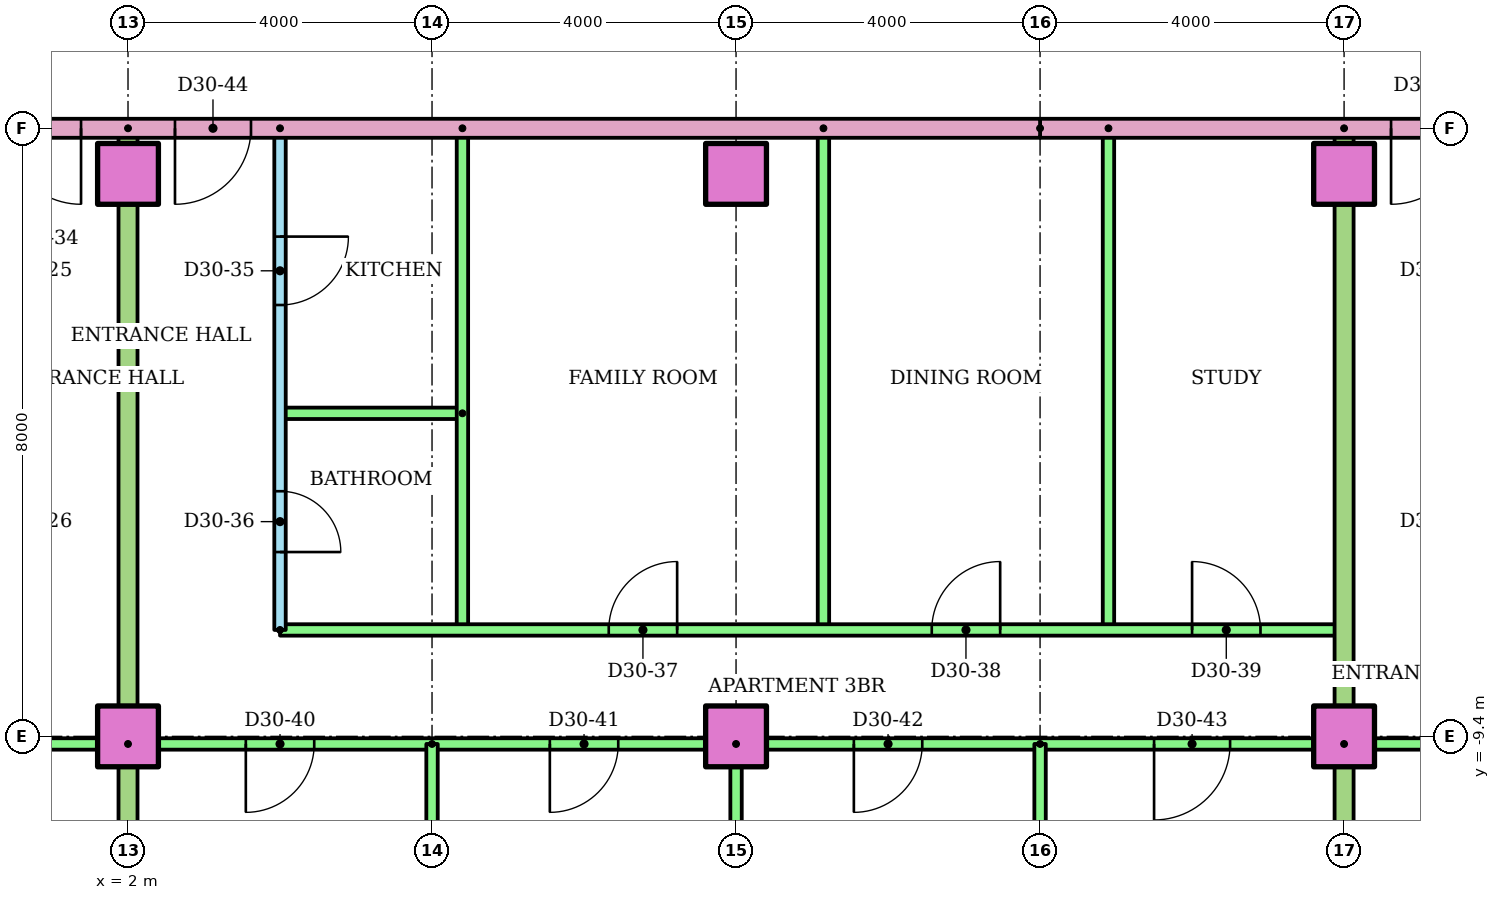
"""IFC4 building model, lengths in metres.
Left out: names, types, materials, properties, quantities, classifications, styles, units other than length and angle.
Written with IfcOpenShell. Run it as: python <this file> out.ifc"""

import sys

from ifc_helpers import new_model, si_unit, direction, frame, frame_2d, origin, origin_2d, place, context, subcontext, project, spatial, rectangle, extrude, element, fill, save


model = new_model("IFC4")
c1 = context("Model", 3, precision=1e-05, world=origin(), true_north=direction((0.0, 1.0)))
c2 = subcontext(c1, "Body", "Model", "MODEL_VIEW")
j1 = project(units=[si_unit("LENGTHUNIT", "METRE"), si_unit("PLANEANGLEUNIT", "RADIAN")], contexts=[c1])
p1 = place(None, origin())
s1 = spatial("IfcSite", under=j1, at=p1, CompositionType="ELEMENT")
p2 = place(p1, origin())
s2 = spatial("IfcBuilding", under=s1, at=p2, CompositionType="ELEMENT")
p3 = place(p2, frame((0.0, 0.0, 119.8)))
s3 = spatial("IfcBuildingStorey", under=s2, at=p3, CompositionType="ELEMENT", Elevation=119.8)
for number, where in (
    (1, (2.0, -9.4, 0.0)),
    (2, (10.0, -9.4, 0.0)),
    (3, (18.0, -9.4, 0.0)),
    (4, (2.0, -2.0, 0.0)),
    (5, (10.0, -2.0, 0.0)),
    (6, (18.0, -2.0, 0.0)),
):
    element("IfcColumn", number, at=place(p3, frame(where)), inside=s3, PredefinedType="COLUMN", context=c2, shape_type="SweptSolid", body=[
        extrude(rectangle(XDim=0.8, YDim=0.8, at=origin_2d()), origin(), (0.0, 0.0, 1.0), 3.2),
    ])
p4 = place(p3, frame((2.0, -9.5, 0.0), z_axis=(0.0, 0.0, 1.0), x_axis=(-1.0, 0.0, 0.0)))
e7 = element("IfcWall", 7, at=p4, inside=s3, PredefinedType="PARTITIONING", context=c2, shape_type="SweptSolid", body=[
    extrude(rectangle(XDim=16.0, YDim=0.15, at=frame_2d((8.0, 0.0))), origin(), (0.0, 0.0, 1.0), 2.4),
])
p5 = place(p4, frame((13.55, 0.0, 0.0)))
e8 = element("IfcOpeningElement", 8, at=p5, cuts=e7, PredefinedType="OPENING", context=c2, shape_type="SweptSolid", body=[
    extrude(rectangle(XDim=0.9, YDim=2.1, at=frame_2d((0.45, 1.05))), frame((0.0, 0.085, 0.0), z_axis=(0.0, -1.0, 0.0), x_axis=(1.0, 0.0, 0.0)), (0.0, 0.0, 1.0), 0.17),
])
p6 = place(p4, frame((9.5, 0.0, 0.0)))
e9 = element("IfcOpeningElement", 9, at=p6, cuts=e7, PredefinedType="OPENING", context=c2, shape_type="SweptSolid", body=[
    extrude(rectangle(XDim=1.0, YDim=2.1, at=frame_2d((0.5, 1.05))), frame((0.0, 0.085, 0.0), z_axis=(0.0, -1.0, 0.0), x_axis=(1.0, 0.0, 0.0)), (0.0, 0.0, 1.0), 0.17),
])
p7 = place(p4, frame((5.55, 0.0, 0.0)))
e10 = element("IfcOpeningElement", 10, at=p7, cuts=e7, PredefinedType="OPENING", context=c2, shape_type="SweptSolid", body=[
    extrude(rectangle(XDim=0.9, YDim=2.1, at=frame_2d((0.45, 1.05))), frame((0.0, 0.085, 0.0), z_axis=(0.0, -1.0, 0.0), x_axis=(1.0, 0.0, 0.0)), (0.0, 0.0, 1.0), 0.17),
])
p8 = place(p4, frame((1.55, 0.0, 0.0)))
e11 = element("IfcOpeningElement", 11, at=p8, cuts=e7, PredefinedType="OPENING", context=c2, shape_type="SweptSolid", body=[
    extrude(rectangle(XDim=0.9, YDim=2.1, at=frame_2d((0.45, 1.05))), frame((0.0, 0.085, 0.0), z_axis=(0.0, -1.0, 0.0), x_axis=(1.0, 0.0, 0.0)), (0.0, 0.0, 1.0), 0.17),
])
p9 = place(p3, frame((4.0, -1.4, 0.0), z_axis=(0.0, 0.0, 1.0), x_axis=(0.0, -1.0, 0.0)))
e12 = element("IfcWall", 12, at=p9, inside=s3, PredefinedType="PARTITIONING", context=c2, shape_type="SweptSolid", body=[
    extrude(rectangle(XDim=6.6, YDim=0.15, at=frame_2d((3.3, 0.0))), origin(), (0.0, 0.0, 1.0), 2.4),
])
p10 = place(p9, frame((1.425, 0.0, 0.0)))
e13 = element("IfcOpeningElement", 13, at=p10, cuts=e12, PredefinedType="OPENING", context=c2, shape_type="SweptSolid", body=[
    extrude(rectangle(XDim=0.9, YDim=2.1, at=frame_2d((0.45, 1.05))), frame((0.0, 0.085, 0.0), z_axis=(0.0, -1.0, 0.0), x_axis=(1.0, 0.0, 0.0)), (0.0, 0.0, 1.0), 0.17),
])
p11 = place(p9, frame((4.775, 0.0, 0.0)))
e14 = element("IfcOpeningElement", 14, at=p11, cuts=e12, PredefinedType="OPENING", context=c2, shape_type="SweptSolid", body=[
    extrude(rectangle(XDim=0.8, YDim=2.1, at=frame_2d((0.4, 1.05))), frame((0.0, 0.085, 0.0), z_axis=(0.0, -1.0, 0.0), x_axis=(1.0, 0.0, 0.0)), (0.0, 0.0, 1.0), 0.17),
])
p12 = place(p3, frame((6.4, -5.15, 0.0), z_axis=(0.0, 0.0, 1.0), x_axis=(-1.0, 0.0, 0.0)))
e15 = element("IfcWall", 15, at=p12, inside=s3, PredefinedType="PARTITIONING", context=c2, shape_type="SweptSolid", body=[
    extrude(rectangle(XDim=2.4, YDim=0.15, at=frame_2d((1.2, 0.0))), origin(), (0.0, 0.0, 1.0), 2.4),
])
for number, where, z_axis, x_axis in (
    (16, (6.4, -1.4, 0.0), (0.0, 0.0, 1.0), (0.0, -1.0, 0.0)),
    (17, (11.15, -1.4, 0.0), (0.0, 0.0, 1.0), (0.0, -1.0, 0.0)),
    (18, (14.9, -1.4, 0.0), (0.0, 0.0, 1.0), (0.0, -1.0, 0.0)),
):
    element("IfcWall", number, at=place(p3, frame(where, z_axis=z_axis, x_axis=x_axis)), inside=s3, PredefinedType="PARTITIONING", context=c2, shape_type="SweptSolid", body=[
        extrude(rectangle(XDim=6.6, YDim=0.15, at=frame_2d((3.3, 0.0))), origin(), (0.0, 0.0, 1.0), 2.4),
    ])
p13 = place(p3, frame((4.0, -8.0, 0.0)))
e19 = element("IfcWall", 19, at=p13, inside=s3, PredefinedType="PARTITIONING", context=c2, shape_type="SweptSolid", body=[
    extrude(rectangle(XDim=14.0, YDim=0.15, at=frame_2d((7.0, 0.0))), origin(), (0.0, 0.0, 1.0), 2.4),
])
p14 = place(p13, frame((4.325, 0.0, 0.0)))
e20 = element("IfcOpeningElement", 20, at=p14, cuts=e19, PredefinedType="OPENING", context=c2, shape_type="SweptSolid", body=[
    extrude(rectangle(XDim=0.9, YDim=2.1, at=frame_2d((0.45, 1.05))), frame((0.0, 0.085, 0.0), z_axis=(0.0, -1.0, 0.0), x_axis=(1.0, 0.0, 0.0)), (0.0, 0.0, 1.0), 0.17),
])
p15 = place(p13, frame((8.575, 0.0, 0.0)))
e21 = element("IfcOpeningElement", 21, at=p15, cuts=e19, PredefinedType="OPENING", context=c2, shape_type="SweptSolid", body=[
    extrude(rectangle(XDim=0.9, YDim=2.1, at=frame_2d((0.45, 1.05))), frame((0.0, 0.085, 0.0), z_axis=(0.0, -1.0, 0.0), x_axis=(1.0, 0.0, 0.0)), (0.0, 0.0, 1.0), 0.17),
])
p16 = place(p13, frame((12.0, 0.0, 0.0)))
e22 = element("IfcOpeningElement", 22, at=p16, cuts=e19, PredefinedType="OPENING", context=c2, shape_type="SweptSolid", body=[
    extrude(rectangle(XDim=0.9, YDim=2.1, at=frame_2d((0.45, 1.05))), frame((0.0, 0.085, 0.0), z_axis=(0.0, -1.0, 0.0), x_axis=(1.0, 0.0, 0.0)), (0.0, 0.0, 1.0), 0.17),
])
p17 = place(p3, frame((18.0, -9.5, 0.0), z_axis=(0.0, 0.0, 1.0), x_axis=(-1.0, 0.0, 0.0)))
e23 = element("IfcWall", 23, at=p17, inside=s3, PredefinedType="PARTITIONING", context=c2, shape_type="SweptSolid", body=[
    extrude(rectangle(XDim=16.0, YDim=0.15, at=frame_2d((8.0, 0.0))), origin(), (0.0, 0.0, 1.0), 2.4),
])
p18 = place(p17, frame((13.55, 0.0, 0.0)))
e24 = element("IfcOpeningElement", 24, at=p18, cuts=e23, PredefinedType="OPENING", context=c2, shape_type="SweptSolid", body=[
    extrude(rectangle(XDim=0.9, YDim=2.1, at=frame_2d((0.45, 1.05))), frame((0.0, 0.085, 0.0), z_axis=(0.0, -1.0, 0.0), x_axis=(1.0, 0.0, 0.0)), (0.0, 0.0, 1.0), 0.17),
])
p19 = place(p17, frame((9.55, 0.0, 0.0)))
e25 = element("IfcOpeningElement", 25, at=p19, cuts=e23, PredefinedType="OPENING", context=c2, shape_type="SweptSolid", body=[
    extrude(rectangle(XDim=0.9, YDim=2.1, at=frame_2d((0.45, 1.05))), frame((0.0, 0.085, 0.0), z_axis=(0.0, -1.0, 0.0), x_axis=(1.0, 0.0, 0.0)), (0.0, 0.0, 1.0), 0.17),
])
p20 = place(p17, frame((5.55, 0.0, 0.0)))
e26 = element("IfcOpeningElement", 26, at=p20, cuts=e23, PredefinedType="OPENING", context=c2, shape_type="SweptSolid", body=[
    extrude(rectangle(XDim=0.9, YDim=2.1, at=frame_2d((0.45, 1.05))), frame((0.0, 0.085, 0.0), z_axis=(0.0, -1.0, 0.0), x_axis=(1.0, 0.0, 0.0)), (0.0, 0.0, 1.0), 0.17),
])
p21 = place(p17, frame((1.5, 0.0, 0.0)))
e27 = element("IfcOpeningElement", 27, at=p21, cuts=e23, PredefinedType="OPENING", context=c2, shape_type="SweptSolid", body=[
    extrude(rectangle(XDim=1.0, YDim=2.1, at=frame_2d((0.5, 1.05))), frame((0.0, 0.085, 0.0), z_axis=(0.0, -1.0, 0.0), x_axis=(1.0, 0.0, 0.0)), (0.0, 0.0, 1.0), 0.17),
])
p22 = place(p3, frame((6.0, -9.5, 0.0), z_axis=(0.0, 0.0, 1.0), x_axis=(0.0, -1.0, 0.0)))
e28 = element("IfcWall", 28, at=p22, inside=s3, PredefinedType="PARTITIONING", context=c2, shape_type="SweptSolid", body=[
    extrude(rectangle(XDim=6.821, YDim=0.15, at=frame_2d((3.411, 0.0))), origin(), (0.0, 0.0, 1.0), 2.4),
])
p23 = place(p3, frame((10.0, -9.5, 0.0), z_axis=(0.0, 0.0, 1.0), x_axis=(0.0, -1.0, 0.0)))
e29 = element("IfcWall", 29, at=p23, inside=s3, PredefinedType="PARTITIONING", context=c2, shape_type="SweptSolid", body=[
    extrude(rectangle(XDim=6.81, YDim=0.15, at=frame_2d((3.405, 0.0))), origin(), (0.0, 0.0, 1.0), 2.4),
])
p24 = place(p3, frame((14.0, -9.5, 0.0), z_axis=(0.0, 0.0, 1.0), x_axis=(0.0, -1.0, 0.0)))
e30 = element("IfcWall", 30, at=p24, inside=s3, PredefinedType="PARTITIONING", context=c2, shape_type="SweptSolid", body=[
    extrude(rectangle(XDim=6.821, YDim=0.15, at=frame_2d((3.411, 0.0))), origin(), (0.0, 0.0, 1.0), 2.4),
])
p25 = place(p3, frame((2.0, -1.4, 0.0), z_axis=(0.0, 0.0, 1.0), x_axis=(0.0, -1.0, 0.0)))
e31 = element("IfcWall", 31, at=p25, inside=s3, PredefinedType="PARTITIONING", context=c2, shape_type="SweptSolid", body=[
    extrude(rectangle(XDim=14.91, YDim=0.25, at=frame_2d((7.455, 0.0))), origin(), (0.0, 0.0, 1.0), 2.4),
])
p26 = place(p3, frame((32.72, -9.5, 0.0), z_axis=(0.0, 0.0, 1.0), x_axis=(-1.0, 0.0, 0.0)))
e32 = element("IfcWall", 32, at=p26, inside=s3, PredefinedType="PARTITIONING", context=c2, shape_type="SweptSolid", body=[
    extrude(rectangle(XDim=14.72, YDim=0.15, at=frame_2d((7.36, 0.0))), origin(), (0.0, 0.0, 1.0), 2.4),
])
p27 = place(p26, frame((12.27, 0.0, 0.0)))
e33 = element("IfcOpeningElement", 33, at=p27, cuts=e32, PredefinedType="OPENING", context=c2, shape_type="SweptSolid", body=[
    extrude(rectangle(XDim=0.9, YDim=2.1, at=frame_2d((0.45, 1.05))), frame((0.0, 0.085, 0.0), z_axis=(0.0, -1.0, 0.0), x_axis=(1.0, 0.0, 0.0)), (0.0, 0.0, 1.0), 0.17),
])
p28 = place(p26, frame((8.22, 0.0, 0.0)))
e34 = element("IfcOpeningElement", 34, at=p28, cuts=e32, PredefinedType="OPENING", context=c2, shape_type="SweptSolid", body=[
    extrude(rectangle(XDim=1.0, YDim=2.1, at=frame_2d((0.5, 1.05))), frame((0.0, 0.085, 0.0), z_axis=(0.0, -1.0, 0.0), x_axis=(1.0, 0.0, 0.0)), (0.0, 0.0, 1.0), 0.17),
])
p29 = place(p26, frame((3.02, 0.0, 0.0)))
e35 = element("IfcOpeningElement", 35, at=p29, cuts=e32, PredefinedType="OPENING", context=c2, shape_type="SweptSolid", body=[
    extrude(rectangle(XDim=0.9, YDim=2.1, at=frame_2d((0.45, 1.05))), frame((0.0, 0.085, 0.0), z_axis=(0.0, -1.0, 0.0), x_axis=(1.0, 0.0, 0.0)), (0.0, 0.0, 1.0), 0.17),
])
p30 = place(p3, frame((18.0, -1.4, 0.0), z_axis=(0.0, 0.0, 1.0), x_axis=(0.0, -1.0, 0.0)))
e36 = element("IfcWall", 36, at=p30, inside=s3, PredefinedType="PARTITIONING", context=c2, shape_type="SweptSolid", body=[
    extrude(rectangle(XDim=14.91, YDim=0.25, at=frame_2d((7.455, 0.0))), origin(), (0.0, 0.0, 1.0), 2.4),
])
p31 = place(p3, frame((29.0, -1.4, 0.0), z_axis=(0.0, 0.0, 1.0), x_axis=(-1.0, 0.0, 0.0)))
e37 = element("IfcWall", 37, at=p31, inside=s3, PredefinedType="PARTITIONING", context=c2, shape_type="SweptSolid", body=[
    extrude(rectangle(XDim=15.0, YDim=0.25, at=frame_2d((7.5, 0.0))), origin(), (0.0, 0.0, 1.0), 2.4),
])
p32 = place(p31, frame((9.382, 0.0, 0.0)))
e38 = element("IfcOpeningElement", 38, at=p32, cuts=e37, PredefinedType="OPENING", context=c2, shape_type="SweptSolid", body=[
    extrude(rectangle(XDim=1.0, YDim=2.1, at=frame_2d((0.5, 1.05))), frame((0.0, 0.135, 0.0), z_axis=(0.0, -1.0, 0.0), x_axis=(1.0, 0.0, 0.0)), (0.0, 0.0, 1.0), 0.27),
])
p33 = place(p3, frame((14.0, -1.4, 0.0), z_axis=(0.0, 0.0, 1.0), x_axis=(-1.0, 0.0, 0.0)))
e39 = element("IfcWall", 39, at=p33, inside=s3, PredefinedType="PARTITIONING", context=c2, shape_type="SweptSolid", body=[
    extrude(rectangle(XDim=28.0, YDim=0.25, at=frame_2d((14.0, 0.0))), origin(), (0.0, 0.0, 1.0), 2.4),
])
p34 = place(p33, frame((12.618, 0.0, 0.0)))
e40 = element("IfcOpeningElement", 40, at=p34, cuts=e39, PredefinedType="OPENING", context=c2, shape_type="SweptSolid", body=[
    extrude(rectangle(XDim=1.0, YDim=2.1, at=frame_2d((0.5, 1.05))), frame((0.0, 0.135, 0.0), z_axis=(0.0, -1.0, 0.0), x_axis=(1.0, 0.0, 0.0)), (0.0, 0.0, 1.0), 0.27),
])
p35 = place(p33, frame((10.382, 0.0, 0.0)))
e41 = element("IfcOpeningElement", 41, at=p35, cuts=e39, PredefinedType="OPENING", context=c2, shape_type="SweptSolid", body=[
    extrude(rectangle(XDim=1.0, YDim=2.1, at=frame_2d((0.5, 1.05))), frame((0.0, 0.135, 0.0), z_axis=(0.0, -1.0, 0.0), x_axis=(1.0, 0.0, 0.0)), (0.0, 0.0, 1.0), 0.27),
])
p36 = place(p34, origin())
e42 = element("IfcDoor", 42, at=p36, inside=s3, OperationType="SINGLE_SWING_LEFT", PredefinedType="DOOR", context=c2, shape_type="SweptSolid", body=[
    extrude(rectangle(XDim=1.0, YDim=2.1, at=frame_2d((0.5, 1.05))), frame((0.0, 0.025, 0.0), z_axis=(0.0, -1.0, 0.0), x_axis=(1.0, 0.0, 0.0)), (0.0, 0.0, 1.0), 0.05),
])
fill(e40, e42)
p37 = place(p10, origin())
e43 = element("IfcDoor", 43, at=p37, inside=s3, OperationType="SINGLE_SWING_LEFT", PredefinedType="DOOR", context=c2, shape_type="SweptSolid", body=[
    extrude(rectangle(XDim=0.9, YDim=2.1, at=frame_2d((0.45, 1.05))), frame((0.0, 0.025, 0.0), z_axis=(0.0, -1.0, 0.0), x_axis=(1.0, 0.0, 0.0)), (0.0, 0.0, 1.0), 0.05),
])
fill(e13, e43)
p38 = place(p11, origin())
e44 = element("IfcDoor", 44, at=p38, inside=s3, OperationType="SINGLE_SWING_RIGHT", PredefinedType="DOOR", context=c2, shape_type="SweptSolid", body=[
    extrude(rectangle(XDim=0.8, YDim=2.1, at=frame_2d((0.4, 1.05))), frame((0.0, 0.025, 0.0), z_axis=(0.0, -1.0, 0.0), x_axis=(1.0, 0.0, 0.0)), (0.0, 0.0, 1.0), 0.05),
])
fill(e14, e44)
p39 = place(p14, origin())
e45 = element("IfcDoor", 45, at=p39, inside=s3, OperationType="SINGLE_SWING_RIGHT", PredefinedType="DOOR", context=c2, shape_type="SweptSolid", body=[
    extrude(rectangle(XDim=0.9, YDim=2.1, at=frame_2d((0.45, 1.05))), frame((0.0, 0.025, 0.0), z_axis=(0.0, -1.0, 0.0), x_axis=(1.0, 0.0, 0.0)), (0.0, 0.0, 1.0), 0.05),
])
fill(e20, e45)
p40 = place(p15, origin())
e46 = element("IfcDoor", 46, at=p40, inside=s3, OperationType="SINGLE_SWING_RIGHT", PredefinedType="DOOR", context=c2, shape_type="SweptSolid", body=[
    extrude(rectangle(XDim=0.9, YDim=2.1, at=frame_2d((0.45, 1.05))), frame((0.0, 0.025, 0.0), z_axis=(0.0, -1.0, 0.0), x_axis=(1.0, 0.0, 0.0)), (0.0, 0.0, 1.0), 0.05),
])
fill(e21, e46)
p41 = place(p16, origin())
e47 = element("IfcDoor", 47, at=p41, inside=s3, OperationType="SINGLE_SWING_LEFT", PredefinedType="DOOR", context=c2, shape_type="SweptSolid", body=[
    extrude(rectangle(XDim=0.9, YDim=2.1, at=frame_2d((0.45, 1.05))), frame((0.0, 0.025, 0.0), z_axis=(0.0, -1.0, 0.0), x_axis=(1.0, 0.0, 0.0)), (0.0, 0.0, 1.0), 0.05),
])
fill(e22, e47)
p42 = place(p18, origin())
e48 = element("IfcDoor", 48, at=p42, inside=s3, OperationType="SINGLE_SWING_RIGHT", PredefinedType="DOOR", context=c2, shape_type="SweptSolid", body=[
    extrude(rectangle(XDim=0.9, YDim=2.1, at=frame_2d((0.45, 1.05))), frame((0.0, 0.025, 0.0), z_axis=(0.0, -1.0, 0.0), x_axis=(1.0, 0.0, 0.0)), (0.0, 0.0, 1.0), 0.05),
])
fill(e24, e48)
p43 = place(p19, origin())
e49 = element("IfcDoor", 49, at=p43, inside=s3, OperationType="SINGLE_SWING_RIGHT", PredefinedType="DOOR", context=c2, shape_type="SweptSolid", body=[
    extrude(rectangle(XDim=0.9, YDim=2.1, at=frame_2d((0.45, 1.05))), frame((0.0, 0.025, 0.0), z_axis=(0.0, -1.0, 0.0), x_axis=(1.0, 0.0, 0.0)), (0.0, 0.0, 1.0), 0.05),
])
fill(e25, e49)
p44 = place(p20, origin())
e50 = element("IfcDoor", 50, at=p44, inside=s3, OperationType="SINGLE_SWING_RIGHT", PredefinedType="DOOR", context=c2, shape_type="SweptSolid", body=[
    extrude(rectangle(XDim=0.9, YDim=2.1, at=frame_2d((0.45, 1.05))), frame((0.0, 0.025, 0.0), z_axis=(0.0, -1.0, 0.0), x_axis=(1.0, 0.0, 0.0)), (0.0, 0.0, 1.0), 0.05),
])
fill(e26, e50)
p45 = place(p21, origin())
e51 = element("IfcDoor", 51, at=p45, inside=s3, OperationType="SINGLE_SWING_RIGHT", PredefinedType="DOOR", context=c2, shape_type="SweptSolid", body=[
    extrude(rectangle(XDim=1.0, YDim=2.1, at=frame_2d((0.5, 1.05))), frame((0.0, 0.025, 0.0), z_axis=(0.0, -1.0, 0.0), x_axis=(1.0, 0.0, 0.0)), (0.0, 0.0, 1.0), 0.05),
])
fill(e27, e51)
p46 = place(p35, origin())
e52 = element("IfcDoor", 52, at=p46, inside=s3, OperationType="SINGLE_SWING_RIGHT", PredefinedType="DOOR", context=c2, shape_type="SweptSolid", body=[
    extrude(rectangle(XDim=1.0, YDim=2.1, at=frame_2d((0.5, 1.05))), frame((0.0, 0.025, 0.0), z_axis=(0.0, -1.0, 0.0), x_axis=(1.0, 0.0, 0.0)), (0.0, 0.0, 1.0), 0.05),
])
fill(e41, e52)
p47 = place(p32, origin())
e53 = element("IfcDoor", 53, at=p47, inside=s3, OperationType="SINGLE_SWING_RIGHT", PredefinedType="DOOR", context=c2, shape_type="SweptSolid", body=[
    extrude(rectangle(XDim=1.0, YDim=2.1, at=frame_2d((0.5, 1.05))), frame((0.0, 0.025, 0.0), z_axis=(0.0, -1.0, 0.0), x_axis=(1.0, 0.0, 0.0)), (0.0, 0.0, 1.0), 0.05),
])
fill(e38, e53)
save(model, sys.argv[1])
